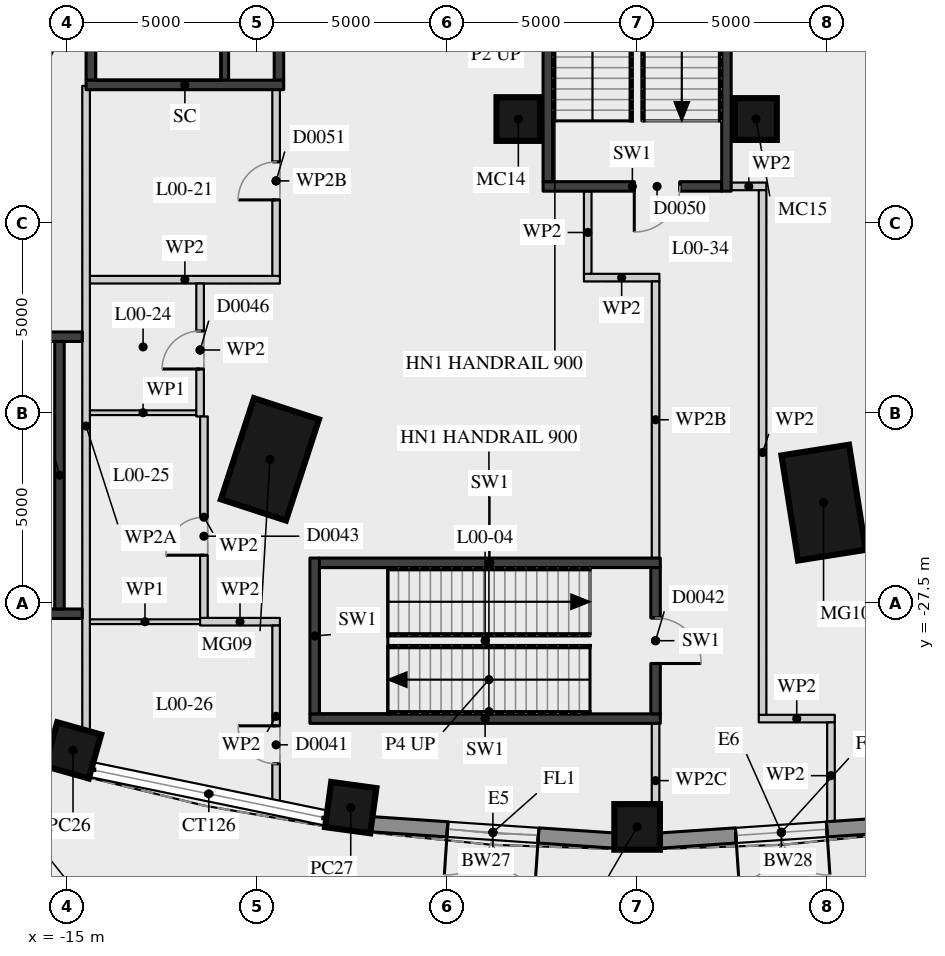
"""IFC4 building model, lengths in metres.
Left out: names, types, materials, properties, quantities, classifications, styles, units other than length and angle.
Written with IfcOpenShell. Run it as: python <this file> out.ifc"""

import sys

from ifc_helpers import new_model, si_unit, direction, frame, frame_2d, origin, origin_2d, place, context, subcontext, project, spatial, rectangle, extrude, element, fill, save


model = new_model("IFC4")
c1 = context("Model", 3, precision=1e-05, world=origin(), true_north=direction((0.0, 1.0)))
c2 = subcontext(c1, "Body", "Model", "MODEL_VIEW")
j1 = project(units=[si_unit("LENGTHUNIT", "METRE"), si_unit("PLANEANGLEUNIT", "RADIAN")], contexts=[c1])
p1 = place(None, origin())
s1 = spatial("IfcSite", under=j1, at=p1, CompositionType="ELEMENT")
p2 = place(p1, origin())
s2 = spatial("IfcBuilding", under=s1, at=p2, CompositionType="ELEMENT")
p3 = place(p2, origin())
s3 = spatial("IfcBuildingStorey", under=s2, at=p3, CompositionType="ELEMENT", Elevation=0.0)
for number, where, z_axis, x_axis in (
    (1, (-9.662, -23.727, 0.0), (0.0, 0.0, 1.0), (-0.31, -0.951, 0.0)),
    (2, (4.906, -24.866, 0.0), (0.0, 0.0, 1.0), (0.156, -0.988, 0.0)),
):
    element("IfcColumn", number, at=place(p3, frame(where, z_axis=z_axis, x_axis=x_axis)), inside=s3, PredefinedType="COLUMN", context=c2, shape_type="SweptSolid", body=[
        extrude(rectangle(XDim=2.8, YDim=1.8, at=origin_2d()), origin(), (0.0, 0.0, 1.0), 7.5),
    ])
p4 = place(p3, frame((-3.126, -14.772, 0.0), z_axis=(0.0, 0.0, 1.0), x_axis=(1.0, 0.0, 0.0)))
e3 = element("IfcColumn", 3, at=p4, inside=s3, PredefinedType="COLUMN", context=c2, shape_type="SweptSolid", body=[
    extrude(rectangle(XDim=1.15, YDim=1.15, at=origin_2d()), origin(), (0.0, 0.0, 1.0), 7.5),
])
p5 = place(p3, frame((3.126, -14.772, 0.0), z_axis=(0.0, 0.0, 1.0), x_axis=(1.0, 0.0, 0.0)))
e4 = element("IfcColumn", 4, at=p5, inside=s3, PredefinedType="COLUMN", context=c2, shape_type="SweptSolid", body=[
    extrude(rectangle(XDim=1.1, YDim=1.1, at=origin_2d()), origin(), (0.0, 0.0, 1.0), 7.5),
])
for number, where, z_axis, x_axis in (
    (5, (-14.844, -31.386, 0.0), (0.0, 0.0, 1.0), (-0.271, -0.963, 0.0)),
    (6, (-7.536, -32.893, 0.0), (0.0, 0.0, 1.0), (-0.135, -0.991, 0.0)),
    (7, (0.0, -33.4, 0.0), (0.0, 0.0, 1.0), (0.0, -1.0, 0.0)),
):
    element("IfcColumn", number, at=place(p3, frame(where, z_axis=z_axis, x_axis=x_axis)), inside=s3, PredefinedType="COLUMN", context=c2, shape_type="SweptSolid", body=[
        extrude(rectangle(XDim=1.2, YDim=1.2, at=origin_2d()), origin(), (0.0, 0.0, 1.0), 7.5),
    ])
p6 = place(p3, frame((-7.02, -33.327, 0.0), z_axis=(0.0, 0.0, 1.0), x_axis=(0.997740655275, -0.067183218234, 0.0)))
e8 = element("IfcWall", 8, at=p6, inside=s3, PredefinedType="SOLIDWALL", context=c2, shape_type="SweptSolid", body=[
    extrude(rectangle(XDim=6.465, YDim=0.4, at=frame_2d((3.232, 0.0))), origin(), (0.0, 0.0, 1.0), 6.19),
])
p7 = place(p6, frame((2.032, 0.0, 0.0)))
e9 = element("IfcOpeningElement", 9, at=p7, cuts=e8, PredefinedType="OPENING", context=c2, shape_type="SweptSolid", body=[
    extrude(rectangle(XDim=2.4, YDim=2.2, at=frame_2d((1.2, 1.1))), frame((0.0, 0.21, 0.0), z_axis=(0.0, -1.0, 0.0), x_axis=(1.0, 0.0, 0.0)), (0.0, 0.0, 1.0), 0.42),
])
p8 = place(p6, frame((2.032, 0.0, 2.6)))
e10 = element("IfcOpeningElement", 10, at=p8, cuts=e8, PredefinedType="OPENING", context=c2, shape_type="SweptSolid", body=[
    extrude(rectangle(XDim=2.4, YDim=3.49, at=frame_2d((1.2, 1.745))), frame((0.0, 0.21, 0.0), z_axis=(0.0, -1.0, 0.0), x_axis=(1.0, 0.0, 0.0)), (0.0, 0.0, 1.0), 0.42),
])
p9 = place(p3, frame((0.57, -33.761, 0.0), z_axis=(0.0, 0.0, 1.0), x_axis=(0.997740655275, 0.067183218234, 0.0)))
e11 = element("IfcWall", 11, at=p9, inside=s3, PredefinedType="SOLIDWALL", context=c2, shape_type="SweptSolid", body=[
    extrude(rectangle(XDim=6.465, YDim=0.4, at=frame_2d((3.232, 0.0))), origin(), (0.0, 0.0, 1.0), 6.19),
])
p10 = place(p9, frame((2.032, 0.0, 0.0)))
e12 = element("IfcOpeningElement", 12, at=p10, cuts=e11, PredefinedType="OPENING", context=c2, shape_type="SweptSolid", body=[
    extrude(rectangle(XDim=2.4, YDim=2.2, at=frame_2d((1.2, 1.1))), frame((0.0, 0.21, 0.0), z_axis=(0.0, -1.0, 0.0), x_axis=(1.0, 0.0, 0.0)), (0.0, 0.0, 1.0), 0.42),
])
p11 = place(p9, frame((2.032, 0.0, 2.6)))
e13 = element("IfcOpeningElement", 13, at=p11, cuts=e11, PredefinedType="OPENING", context=c2, shape_type="SweptSolid", body=[
    extrude(rectangle(XDim=2.4, YDim=3.49, at=frame_2d((1.2, 1.745))), frame((0.0, 0.21, 0.0), z_axis=(0.0, -1.0, 0.0), x_axis=(1.0, 0.0, 0.0)), (0.0, 0.0, 1.0), 0.42),
])
p12 = place(p3, frame((-10.85, -13.75, 0.0), z_axis=(0.0, 0.0, 1.0), x_axis=(0.0, 1.0, 0.0)))
e14 = element("IfcWall", 14, at=p12, inside=s3, PredefinedType="SHEAR", context=c2, shape_type="SweptSolid", body=[
    extrude(rectangle(XDim=6.0, YDim=0.2, at=frame_2d((3.0, 0.0))), origin(), (0.0, 0.0, 1.0), 7.09),
])
p13 = place(p12, frame((4.4, 0.0, 0.0)))
e15 = element("IfcOpeningElement", 15, at=p13, cuts=e14, PredefinedType="OPENING", context=c2, shape_type="SweptSolid", body=[
    extrude(rectangle(XDim=1.5, YDim=2.1, at=frame_2d((0.75, 1.05))), frame((0.0, 0.11, 0.0), z_axis=(0.0, -1.0, 0.0), x_axis=(1.0, 0.0, 0.0)), (0.0, 0.0, 1.0), 0.22),
])
p14 = place(p3, frame((-14.375, -13.75, 0.0), z_axis=(0.0, 0.0, 1.0), x_axis=(0.0, 1.0, 0.0)))
e16 = element("IfcWall", 16, at=p14, inside=s3, PredefinedType="SHEAR", context=c2, shape_type="SweptSolid", body=[
    extrude(rectangle(XDim=6.0, YDim=0.25, at=frame_2d((3.0, 0.0))), origin(), (0.0, 0.0, 1.0), 7.09),
])
p15 = place(p3, frame((-9.425, -13.75, 0.0), z_axis=(0.0, 0.0, 1.0), x_axis=(0.0, 1.0, 0.0)))
e17 = element("IfcWall", 17, at=p15, inside=s3, PredefinedType="SHEAR", context=c2, shape_type="SweptSolid", body=[
    extrude(rectangle(XDim=6.0, YDim=0.25, at=frame_2d((3.0, 0.0))), origin(), (0.0, 0.0, 1.0), 7.09),
])
p16 = place(p15, frame((2.4, 0.0, 0.0)))
e18 = element("IfcOpeningElement", 18, at=p16, cuts=e17, PredefinedType="OPENING", context=c2, shape_type="SweptSolid", body=[
    extrude(rectangle(XDim=1.5, YDim=2.1, at=frame_2d((0.75, 1.05))), frame((0.0, 0.135, 0.0), z_axis=(0.0, -1.0, 0.0), x_axis=(1.0, 0.0, 0.0)), (0.0, 0.0, 1.0), 0.27),
])
p17 = place(p3, frame((-14.5, -13.875, 0.0), z_axis=(0.0, 0.0, 1.0), x_axis=(1.0, 0.0, 0.0)))
e19 = element("IfcWall", 19, at=p17, inside=s3, PredefinedType="SHEAR", context=c2, shape_type="SweptSolid", body=[
    extrude(rectangle(XDim=5.2, YDim=0.25, at=frame_2d((2.6, 0.0))), origin(), (0.0, 0.0, 1.0), 7.09),
])
p18 = place(p3, frame((-8.61, -30.55, 0.0), z_axis=(0.0, 0.0, 1.0), x_axis=(1.0, 0.0, 0.0)))
e20 = element("IfcWall", 20, at=p18, inside=s3, PredefinedType="SOLIDWALL", context=c2, shape_type="SweptSolid", body=[
    extrude(rectangle(XDim=9.22, YDim=0.25, at=frame_2d((4.61, 0.0))), origin(), (0.0, 0.0, 1.0), 7.09),
])
p19 = place(p3, frame((3.2, -30.55, 0.0), z_axis=(0.0, 0.0, 1.0), x_axis=(1.0, 0.0, 0.0)))
e21 = element("IfcWall", 21, at=p19, inside=s3, PredefinedType="PARTITIONING", context=c2, shape_type="SweptSolid", body=[
    extrude(rectangle(XDim=2.0, YDim=0.2, at=frame_2d((1.0, 0.0))), origin(), (0.0, 0.0, 1.0), 7.09),
])
p20 = place(p3, frame((-14.4, -28.0, 0.0), z_axis=(0.0, 0.0, 1.0), x_axis=(1.0, 0.0, 0.0)))
e22 = element("IfcWall", 22, at=p20, inside=s3, PredefinedType="PARTITIONING", context=c2, shape_type="SweptSolid", body=[
    extrude(rectangle(XDim=2.9, YDim=0.125, at=frame_2d((1.45, 0.0))), origin(), (0.0, 0.0, 1.0), 7.09),
])
p21 = place(p3, frame((-11.5, -28.0, 0.0), z_axis=(0.0, 0.0, 1.0), x_axis=(1.0, 0.0, 0.0)))
e23 = element("IfcWall", 23, at=p21, inside=s3, PredefinedType="PARTITIONING", context=c2, shape_type="SweptSolid", body=[
    extrude(rectangle(XDim=2.1, YDim=0.2, at=frame_2d((1.05, 0.0))), origin(), (0.0, 0.0, 1.0), 7.09),
])
p22 = place(p3, frame((-19.425, -27.79, 0.0), z_axis=(0.0, 0.0, 1.0), x_axis=(1.0, 0.0, 0.0)))
e24 = element("IfcWall", 24, at=p22, inside=s3, PredefinedType="SOLIDWALL", context=c2, shape_type="SweptSolid", body=[
    extrude(rectangle(XDim=4.825, YDim=0.25, at=frame_2d((2.413, 0.0))), origin(), (0.0, 0.0, 1.0), 7.09),
])
p23 = place(p3, frame((-8.36, -26.45, 0.0), z_axis=(0.0, 0.0, 1.0), x_axis=(1.0, 0.0, 0.0)))
e25 = element("IfcWall", 25, at=p23, inside=s3, PredefinedType="SOLIDWALL", context=c2, shape_type="SweptSolid", body=[
    extrude(rectangle(XDim=8.97, YDim=0.25, at=frame_2d((4.485, 0.0))), origin(), (0.0, 0.0, 1.0), 7.09),
])
p24 = place(p3, frame((-14.4, -22.5, 0.0), z_axis=(0.0, 0.0, 1.0), x_axis=(1.0, 0.0, 0.0)))
e26 = element("IfcWall", 26, at=p24, inside=s3, PredefinedType="PARTITIONING", context=c2, shape_type="SweptSolid", body=[
    extrude(rectangle(XDim=2.8, YDim=0.125, at=frame_2d((1.4, 0.0))), origin(), (0.0, 0.0, 1.0), 7.09),
])
p25 = place(p3, frame((-19.425, -20.5, 0.0), z_axis=(0.0, 0.0, 1.0), x_axis=(1.0, 0.0, 0.0)))
e27 = element("IfcWall", 27, at=p25, inside=s3, PredefinedType="SOLIDWALL", context=c2, shape_type="SweptSolid", body=[
    extrude(rectangle(XDim=4.825, YDim=0.25, at=frame_2d((2.413, 0.0))), origin(), (0.0, 0.0, 1.0), 7.09),
])
p26 = place(p3, frame((-14.4, -19.0, 0.0), z_axis=(0.0, 0.0, 1.0), x_axis=(1.0, 0.0, 0.0)))
e28 = element("IfcWall", 28, at=p26, inside=s3, PredefinedType="PARTITIONING", context=c2, shape_type="SweptSolid", body=[
    extrude(rectangle(XDim=5.0, YDim=0.2, at=frame_2d((2.5, 0.0))), origin(), (0.0, 0.0, 1.0), 7.09),
])
p27 = place(p3, frame((-1.4, -18.945, 0.0), z_axis=(0.0, 0.0, 1.0), x_axis=(1.0, 0.0, 0.0)))
e29 = element("IfcWall", 29, at=p27, inside=s3, PredefinedType="PARTITIONING", context=c2, shape_type="SweptSolid", body=[
    extrude(rectangle(XDim=1.985, YDim=0.2, at=frame_2d((0.992, 0.0))), origin(), (0.0, 0.0, 1.0), 7.09),
])
p28 = place(p3, frame((-2.475, -16.545, 0.0), z_axis=(0.0, 0.0, 1.0), x_axis=(1.0, 0.0, 0.0)))
e30 = element("IfcWall", 30, at=p28, inside=s3, PredefinedType="SOLIDWALL", context=c2, shape_type="SweptSolid", body=[
    extrude(rectangle(XDim=4.7, YDim=0.25, at=frame_2d((2.35, 0.0))), origin(), (0.0, 0.0, 1.0), 7.09),
])
p29 = place(p28, frame((2.4, 0.0, 0.0)))
e31 = element("IfcOpeningElement", 31, at=p29, cuts=e30, PredefinedType="OPENING", context=c2, shape_type="SweptSolid", body=[
    extrude(rectangle(XDim=1.2, YDim=2.1, at=frame_2d((0.6, 1.05))), frame((0.0, 0.135, 0.0), z_axis=(0.0, -1.0, 0.0), x_axis=(1.0, 0.0, 0.0)), (0.0, 0.0, 1.0), 0.27),
])
p30 = place(p3, frame((2.475, -16.545, 0.0), z_axis=(0.0, 0.0, 1.0), x_axis=(1.0, 0.0, 0.0)))
e32 = element("IfcWall", 32, at=p30, inside=s3, PredefinedType="PARTITIONING", context=c2, shape_type="SweptSolid", body=[
    extrude(rectangle(XDim=0.925, YDim=0.2, at=frame_2d((0.462, 0.0))), origin(), (0.0, 0.0, 1.0), 7.09),
])
p31 = place(p3, frame((-15.2, -27.665, 0.0), z_axis=(0.0, 0.0, 1.0), x_axis=(0.0, 1.0, 0.0)))
e33 = element("IfcWall", 33, at=p31, inside=s3, PredefinedType="SOLIDWALL", context=c2, shape_type="SweptSolid", body=[
    extrude(rectangle(XDim=7.04, YDim=0.25, at=frame_2d((3.52, 0.0))), origin(), (0.0, 0.0, 1.0), 7.09),
])
p32 = place(p3, frame((-14.5, -31.803, 0.0), z_axis=(0.0, 0.0, 1.0), x_axis=(0.0, 1.0, 0.0)))
e34 = element("IfcWall", 34, at=p32, inside=s3, PredefinedType="PARTITIONING", context=c2, shape_type="SweptSolid", body=[
    extrude(rectangle(XDim=17.903, YDim=0.2, at=frame_2d((8.952, 0.0))), origin(), (0.0, 0.0, 1.0), 6.64),
])
p33 = place(p3, frame((-11.5, -22.6, 0.0), z_axis=(0.0, 0.0, 1.0), x_axis=(0.0, 1.0, 0.0)))
e35 = element("IfcWall", 35, at=p33, inside=s3, PredefinedType="PARTITIONING", context=c2, shape_type="SweptSolid", body=[
    extrude(rectangle(XDim=3.5, YDim=0.2, at=frame_2d((1.75, 0.0))), origin(), (0.0, 0.0, 1.0), 7.09),
])
p34 = place(p33, frame((1.25, 0.0, 0.0)))
e36 = element("IfcOpeningElement", 36, at=p34, cuts=e35, PredefinedType="OPENING", context=c2, shape_type="SweptSolid", body=[
    extrude(rectangle(XDim=1.0, YDim=2.1, at=frame_2d((0.5, 1.05))), frame((0.0, 0.11, 0.0), z_axis=(0.0, -1.0, 0.0), x_axis=(1.0, 0.0, 0.0)), (0.0, 0.0, 1.0), 0.22),
])
p35 = place(p3, frame((-11.4, -27.9, 0.0), z_axis=(0.0, 0.0, 1.0), x_axis=(0.0, 1.0, 0.0)))
e37 = element("IfcWall", 37, at=p35, inside=s3, PredefinedType="PARTITIONING", context=c2, shape_type="SweptSolid", body=[
    extrude(rectangle(XDim=5.3, YDim=0.2, at=frame_2d((2.65, 0.0))), origin(), (0.0, 0.0, 1.0), 7.09),
])
p36 = place(p35, frame((1.65, 0.0, 0.0)))
e38 = element("IfcOpeningElement", 38, at=p36, cuts=e37, PredefinedType="OPENING", context=c2, shape_type="SweptSolid", body=[
    extrude(rectangle(XDim=1.0, YDim=2.1, at=frame_2d((0.5, 1.05))), frame((0.0, 0.11, 0.0), z_axis=(0.0, -1.0, 0.0), x_axis=(1.0, 0.0, 0.0)), (0.0, 0.0, 1.0), 0.22),
])
p37 = place(p3, frame((-9.5, -32.881, 0.0), z_axis=(0.0, 0.0, 1.0), x_axis=(0.0, 1.0, 0.0)))
e39 = element("IfcWall", 39, at=p37, inside=s3, PredefinedType="PARTITIONING", context=c2, shape_type="SweptSolid", body=[
    extrude(rectangle(XDim=4.781, YDim=0.2, at=frame_2d((2.39, 0.0))), origin(), (0.0, 0.0, 1.0), 7.09),
])
p38 = place(p37, frame((1.14, 0.0, 0.0)))
e40 = element("IfcOpeningElement", 40, at=p38, cuts=e39, PredefinedType="OPENING", context=c2, shape_type="SweptSolid", body=[
    extrude(rectangle(XDim=1.0, YDim=2.1, at=frame_2d((0.5, 1.05))), frame((0.0, 0.11, 0.0), z_axis=(0.0, -1.0, 0.0), x_axis=(1.0, 0.0, 0.0)), (0.0, 0.0, 1.0), 0.22),
])
p39 = place(p3, frame((-9.5, -18.9, 0.0), z_axis=(0.0, 0.0, 1.0), x_axis=(0.0, 1.0, 0.0)))
e41 = element("IfcWall", 41, at=p39, inside=s3, PredefinedType="PARTITIONING", context=c2, shape_type="SweptSolid", body=[
    extrude(rectangle(XDim=5.0, YDim=0.2, at=frame_2d((2.5, 0.0))), origin(), (0.0, 0.0, 1.0), 6.54),
])
p40 = place(p39, frame((2.0, 0.0, 0.0)))
e42 = element("IfcOpeningElement", 42, at=p40, cuts=e41, PredefinedType="OPENING", context=c2, shape_type="SweptSolid", body=[
    extrude(rectangle(XDim=1.0, YDim=2.1, at=frame_2d((0.5, 1.05))), frame((0.0, 0.11, 0.0), z_axis=(0.0, -1.0, 0.0), x_axis=(1.0, 0.0, 0.0)), (0.0, 0.0, 1.0), 0.22),
])
p41 = place(p3, frame((-8.485, -30.425, 0.0), z_axis=(0.0, 0.0, 1.0), x_axis=(0.0, 1.0, 0.0)))
e43 = element("IfcWall", 43, at=p41, inside=s3, PredefinedType="SOLIDWALL", context=c2, shape_type="SweptSolid", body=[
    extrude(rectangle(XDim=4.1, YDim=0.25, at=frame_2d((2.05, 0.0))), origin(), (0.0, 0.0, 1.0), 7.09),
])
p42 = place(p3, frame((-2.35, -16.42, 0.0), z_axis=(0.0, 0.0, 1.0), x_axis=(0.0, 1.0, 0.0)))
e44 = element("IfcWall", 44, at=p42, inside=s3, PredefinedType="SOLIDWALL", context=c2, shape_type="SweptSolid", body=[
    extrude(rectangle(XDim=9.27, YDim=0.25, at=frame_2d((4.635, 0.0))), origin(), (0.0, 0.0, 1.0), 7.09),
])
p43 = place(p3, frame((-1.3, -18.845, 0.0), z_axis=(0.0, 0.0, 1.0), x_axis=(0.0, 1.0, 0.0)))
e45 = element("IfcWall", 45, at=p43, inside=s3, PredefinedType="PARTITIONING", context=c2, shape_type="SweptSolid", body=[
    extrude(rectangle(XDim=2.175, YDim=0.2, at=frame_2d((1.087, 0.0))), origin(), (0.0, 0.0, 1.0), 7.09),
])
p44 = place(p3, frame((0.485, -33.689, 0.0), z_axis=(0.0, 0.0, 1.0), x_axis=(0.0, 1.0, 0.0)))
e46 = element("IfcWall", 46, at=p44, inside=s3, PredefinedType="PARTITIONING", context=c2, shape_type="SweptSolid", body=[
    extrude(rectangle(XDim=3.014, YDim=0.2, at=frame_2d((1.507, 0.0))), origin(), (0.0, 0.0, 1.0), 6.19),
])
p45 = place(p3, frame((0.485, -30.425, 0.0), z_axis=(0.0, 0.0, 1.0), x_axis=(0.0, 1.0, 0.0)))
e47 = element("IfcWall", 47, at=p45, inside=s3, PredefinedType="SOLIDWALL", context=c2, shape_type="SweptSolid", body=[
    extrude(rectangle(XDim=3.85, YDim=0.25, at=frame_2d((1.925, 0.0))), origin(), (0.0, 0.0, 1.0), 7.09),
])
p46 = place(p45, frame((1.325, 0.0, 0.0)))
e48 = element("IfcOpeningElement", 48, at=p46, cuts=e47, PredefinedType="OPENING", context=c2, shape_type="SweptSolid", body=[
    extrude(rectangle(XDim=1.2, YDim=2.1, at=frame_2d((0.6, 1.05))), frame((0.0, 0.135, 0.0), z_axis=(0.0, -1.0, 0.0), x_axis=(1.0, 0.0, 0.0)), (0.0, 0.0, 1.0), 0.27),
])
p47 = place(p3, frame((0.485, -26.325, 0.0), z_axis=(0.0, 0.0, 1.0), x_axis=(0.0, 1.0, 0.0)))
e49 = element("IfcWall", 49, at=p47, inside=s3, PredefinedType="PARTITIONING", context=c2, shape_type="SweptSolid", body=[
    extrude(rectangle(XDim=7.28, YDim=0.2, at=frame_2d((3.64, 0.0))), origin(), (0.0, 0.0, 1.0), 6.54),
])
p48 = place(p3, frame((2.35, -16.67, 0.0), z_axis=(0.0, 0.0, 1.0), x_axis=(0.0, 1.0, 0.0)))
e50 = element("IfcWall", 50, at=p48, inside=s3, PredefinedType="SOLIDWALL", context=c2, shape_type="SweptSolid", body=[
    extrude(rectangle(XDim=9.27, YDim=0.25, at=frame_2d((4.635, 0.0))), origin(), (0.0, 0.0, 1.0), 7.09),
])
p49 = place(p3, frame((3.3, -30.45, 0.0), z_axis=(0.0, 0.0, 1.0), x_axis=(0.0, 1.0, 0.0)))
e51 = element("IfcWall", 51, at=p49, inside=s3, PredefinedType="PARTITIONING", context=c2, shape_type="SweptSolid", body=[
    extrude(rectangle(XDim=13.805, YDim=0.2, at=frame_2d((6.902, 0.0))), origin(), (0.0, 0.0, 1.0), 7.09),
])
p50 = place(p3, frame((5.1, -33.453, 0.0), z_axis=(0.0, 0.0, 1.0), x_axis=(0.0, 1.0, 0.0)))
e52 = element("IfcWall", 52, at=p50, inside=s3, PredefinedType="PARTITIONING", context=c2, shape_type="SweptSolid", body=[
    extrude(rectangle(XDim=2.803, YDim=0.2, at=frame_2d((1.401, 0.0))), origin(), (0.0, 0.0, 1.0), 7.09),
])
p51 = place(p7, frame((2.4, 0.0, 0.0), z_axis=(0.0, 0.0, 1.0), x_axis=(-1.0, 0.0, 0.0)))
e53 = element("IfcDoor", 53, at=p51, inside=s3, OperationType="DOUBLE_DOOR_SINGLE_SWING", PredefinedType="DOOR", context=c2, shape_type="SweptSolid", body=[
    extrude(rectangle(XDim=2.4, YDim=2.2, at=frame_2d((1.2, 1.1))), frame((0.0, 0.05, 0.0), z_axis=(0.0, -1.0, 0.0), x_axis=(1.0, 0.0, 0.0)), (0.0, 0.0, 1.0), 0.05),
])
fill(e9, e53)
p52 = place(p8, origin())
e54 = element("IfcWindow", 54, at=p52, inside=s3, PartitioningType="SINGLE_PANEL", PredefinedType="WINDOW", context=c2, shape_type="SweptSolid", body=[
    extrude(rectangle(XDim=2.4, YDim=3.49, at=frame_2d((1.2, 1.745))), frame((0.0, 0.01, 0.0), z_axis=(0.0, -1.0, 0.0), x_axis=(1.0, 0.0, 0.0)), (0.0, 0.0, 1.0), 0.06),
])
fill(e10, e54)
p53 = place(p10, frame((2.4, 0.0, 0.0), z_axis=(0.0, 0.0, 1.0), x_axis=(-1.0, 0.0, 0.0)))
e55 = element("IfcDoor", 55, at=p53, inside=s3, OperationType="DOUBLE_DOOR_SINGLE_SWING", PredefinedType="DOOR", context=c2, shape_type="SweptSolid", body=[
    extrude(rectangle(XDim=2.4, YDim=2.2, at=frame_2d((1.2, 1.1))), frame((0.0, 0.05, 0.0), z_axis=(0.0, -1.0, 0.0), x_axis=(1.0, 0.0, 0.0)), (0.0, 0.0, 1.0), 0.05),
])
fill(e12, e55)
p54 = place(p11, origin())
e56 = element("IfcWindow", 56, at=p54, inside=s3, PartitioningType="SINGLE_PANEL", PredefinedType="WINDOW", context=c2, shape_type="SweptSolid", body=[
    extrude(rectangle(XDim=2.4, YDim=3.49, at=frame_2d((1.2, 1.745))), frame((0.0, 0.01, 0.0), z_axis=(0.0, -1.0, 0.0), x_axis=(1.0, 0.0, 0.0)), (0.0, 0.0, 1.0), 0.06),
])
fill(e13, e56)
p55 = place(p29, origin())
e57 = element("IfcDoor", 57, at=p55, inside=s3, OperationType="SINGLE_SWING_RIGHT", PredefinedType="DOOR", context=c2, shape_type="SweptSolid", body=[
    extrude(rectangle(XDim=1.2, YDim=2.1, at=frame_2d((0.6, 1.05))), frame((0.0, 0.025, 0.0), z_axis=(0.0, -1.0, 0.0), x_axis=(1.0, 0.0, 0.0)), (0.0, 0.0, 1.0), 0.05),
])
fill(e31, e57)
p56 = place(p46, origin())
e58 = element("IfcDoor", 58, at=p56, inside=s3, OperationType="SINGLE_SWING_RIGHT", PredefinedType="DOOR", context=c2, shape_type="SweptSolid", body=[
    extrude(rectangle(XDim=1.2, YDim=2.1, at=frame_2d((0.6, 1.05))), frame((0.0, 0.025, 0.0), z_axis=(0.0, -1.0, 0.0), x_axis=(1.0, 0.0, 0.0)), (0.0, 0.0, 1.0), 0.05),
])
fill(e48, e58)
p57 = place(p40, origin())
e59 = element("IfcDoor", 59, at=p57, inside=s3, OperationType="SINGLE_SWING_LEFT", PredefinedType="DOOR", context=c2, shape_type="SweptSolid", body=[
    extrude(rectangle(XDim=1.0, YDim=2.1, at=frame_2d((0.5, 1.05))), frame((0.0, 0.025, 0.0), z_axis=(0.0, -1.0, 0.0), x_axis=(1.0, 0.0, 0.0)), (0.0, 0.0, 1.0), 0.05),
])
fill(e42, e59)
p58 = place(p34, origin())
e60 = element("IfcDoor", 60, at=p58, inside=s3, OperationType="SINGLE_SWING_LEFT", PredefinedType="DOOR", context=c2, shape_type="SweptSolid", body=[
    extrude(rectangle(XDim=1.0, YDim=2.1, at=frame_2d((0.5, 1.05))), frame((0.0, 0.025, 0.0), z_axis=(0.0, -1.0, 0.0), x_axis=(1.0, 0.0, 0.0)), (0.0, 0.0, 1.0), 0.05),
])
fill(e36, e60)
p59 = place(p36, origin())
e61 = element("IfcDoor", 61, at=p59, inside=s3, OperationType="SINGLE_SWING_LEFT", PredefinedType="DOOR", context=c2, shape_type="SweptSolid", body=[
    extrude(rectangle(XDim=1.0, YDim=2.1, at=frame_2d((0.5, 1.05))), frame((0.0, 0.025, 0.0), z_axis=(0.0, -1.0, 0.0), x_axis=(1.0, 0.0, 0.0)), (0.0, 0.0, 1.0), 0.05),
])
fill(e38, e61)
p60 = place(p38, origin())
e62 = element("IfcDoor", 62, at=p60, inside=s3, OperationType="SINGLE_SWING_RIGHT", PredefinedType="DOOR", context=c2, shape_type="SweptSolid", body=[
    extrude(rectangle(XDim=1.0, YDim=2.1, at=frame_2d((0.5, 1.05))), frame((0.0, 0.025, 0.0), z_axis=(0.0, -1.0, 0.0), x_axis=(1.0, 0.0, 0.0)), (0.0, 0.0, 1.0), 0.05),
])
fill(e40, e62)
save(model, sys.argv[1])
